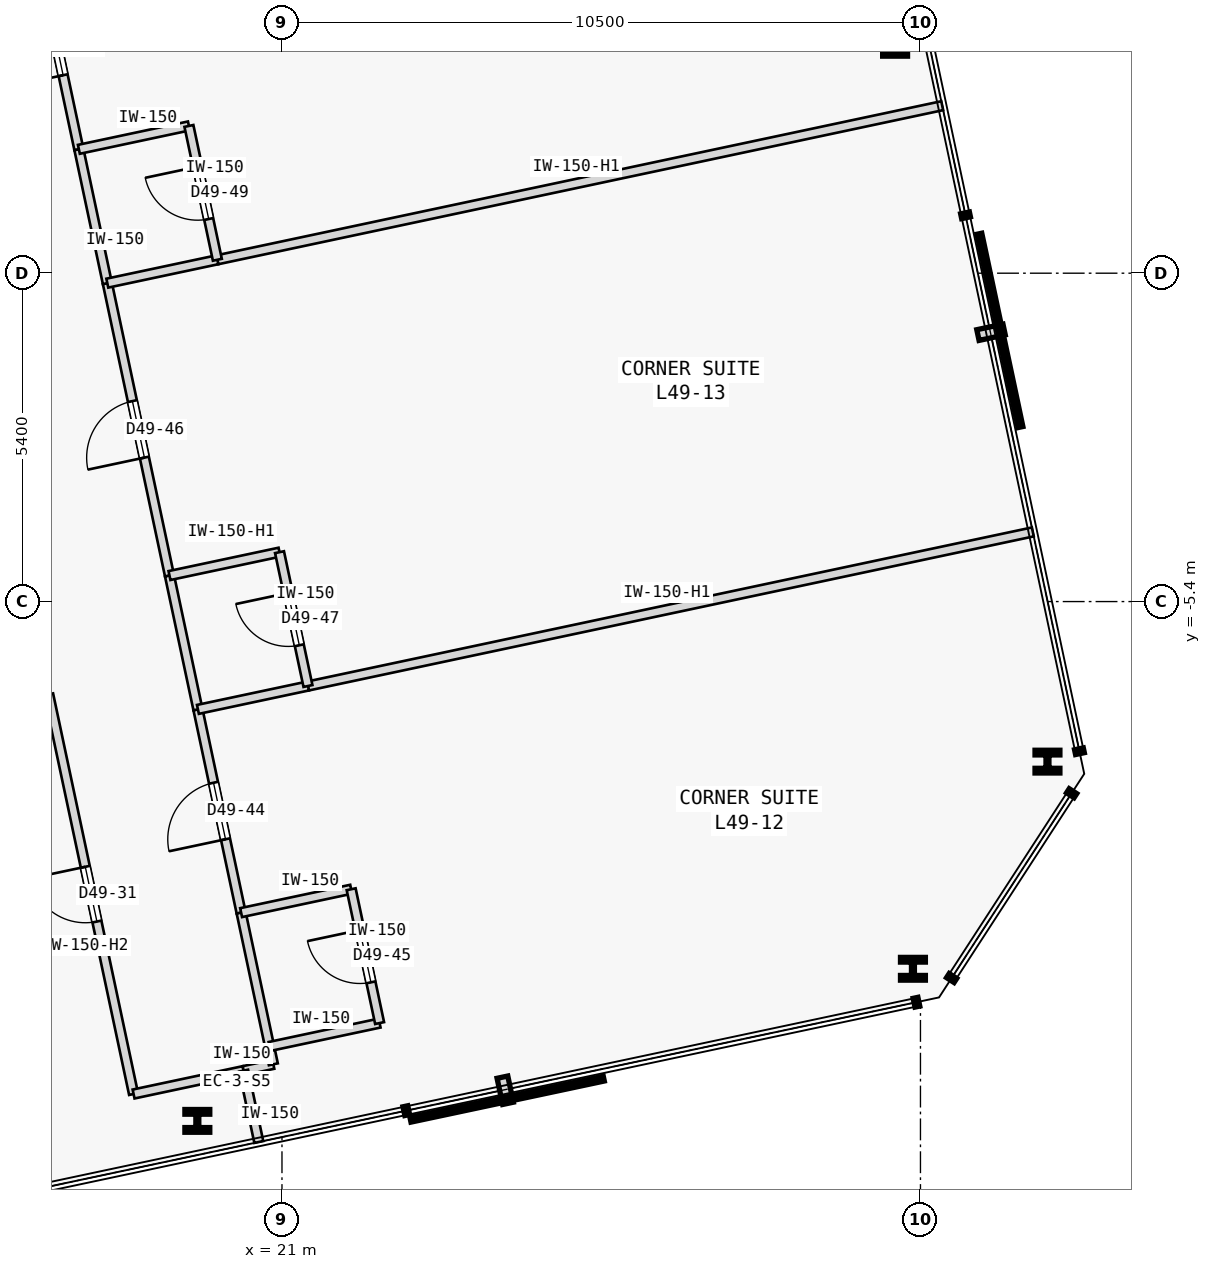
"""IFC4 building model, lengths in metres.
Left out: names, types, materials, properties, quantities, classifications, styles, units other than length and angle.
Written with IfcOpenShell. Run it as: python <this file> out.ifc"""

import sys

from ifc_helpers import new_model, si_unit, direction, frame, frame_2d, origin, origin_2d, place, context, subcontext, project, spatial, rectangle, i_section, extrude, element, fill, save


model = new_model("IFC4")
c1 = context("Model", 3, precision=1e-05, world=origin(), true_north=direction((0.0, 1.0)))
c2 = subcontext(c1, "Body", "Model", "MODEL_VIEW")
j1 = project(units=[si_unit("LENGTHUNIT", "METRE"), si_unit("PLANEANGLEUNIT", "RADIAN")], contexts=[c1])
p1 = place(None, origin())
s1 = spatial("IfcSite", under=j1, at=p1, CompositionType="ELEMENT")
p2 = place(p1, origin())
s2 = spatial("IfcBuilding", under=s1, at=p2, CompositionType="ELEMENT")
p3 = place(p2, frame((0.0, 0.0, 188.8)))
s3 = spatial("IfcBuildingStorey", under=s2, at=p3, CompositionType="ELEMENT", Elevation=188.8)
for number, where, z_axis, x_axis in (
    (1, (19.608, -13.94, 0.0), (0.0, 0.0, 1.0), (1.0, 0.0, 0.0)),
    (2, (31.376, -11.439, 0.0), (0.0, 0.0, 1.0), (1.0, 0.0, 0.0)),
    (3, (33.589, -8.032, 0.0), (0.0, 0.0, 1.0), (1.0, 0.0, 0.0)),
    (4, (31.083, 3.756, 0.0), (0.0, 0.0, 1.0), (1.0, 0.0, 0.0)),
):
    element("IfcColumn", number, at=place(p3, frame(where, z_axis=z_axis, x_axis=x_axis)), inside=s3, PredefinedType="COLUMN", context=c2, shape_type="SweptSolid", body=[
        extrude(i_section(OverallWidth=0.409, OverallDepth=0.374, WebThickness=0.048, FlangeThickness=0.077, FilletRadius=0.015, at=origin_2d()), origin(), (0.0, 0.0, 1.0), 3.4),
    ])
p4 = place(p3, frame((18.56, -13.498, 0.0), z_axis=(0.0, 0.0, 1.0), x_axis=(-0.207888737749, 0.978152479278, 0.0)))
e5 = element("IfcWall", 5, at=p4, inside=s3, PredefinedType="PARTITIONING", context=c2, shape_type="SweptSolid", body=[
    extrude(rectangle(XDim=6.72, YDim=0.15, at=frame_2d((3.36, 0.0))), origin(), (0.0, 0.0, 1.0), 2.575),
])
p5 = place(p4, frame((2.9, 0.0, 0.0)))
e6 = element("IfcOpeningElement", 6, at=p5, cuts=e5, PredefinedType="OPENING", context=c2, shape_type="SweptSolid", body=[
    extrude(rectangle(XDim=0.92, YDim=2.15, at=frame_2d((0.46, 1.075))), frame((0.0, 0.085, 0.0), z_axis=(0.0, -1.0, 0.0), x_axis=(1.0, 0.0, 0.0)), (0.0, 0.0, 1.0), 0.17),
])
p6 = place(p3, frame((18.56, -13.498, 0.0), z_axis=(0.0, 0.0, 1.0), x_axis=(0.978160192495, 0.207852442415, 0.0)))
e7 = element("IfcWall", 7, at=p6, inside=s3, PredefinedType="PARTITIONING", context=c2, shape_type="SweptSolid", body=[
    extrude(rectangle(XDim=1.85, YDim=0.15, at=frame_2d((0.925, 0.0))), origin(), (0.0, 0.0, 1.0), 3.175),
])
p7 = place(p3, frame((20.369, -13.114, 0.0), z_axis=(0.0, 0.0, 1.0), x_axis=(0.978143962546, 0.207928806409, 0.0)))
e8 = element("IfcWall", 8, at=p7, inside=s3, PredefinedType="PARTITIONING", context=c2, shape_type="SweptSolid", body=[
    extrude(rectangle(XDim=0.5, YDim=0.15, at=frame_2d((0.25, 0.0))), origin(), (0.0, 0.0, 1.0), 3.175),
])
p8 = place(p3, frame((20.858, -13.01, 0.0), z_axis=(0.0, 0.0, 1.0), x_axis=(-0.208306395052, 0.978063620518, 0.0)))
e9 = element("IfcWall", 9, at=p8, inside=s3, PredefinedType="PARTITIONING", context=c2, shape_type="SweptSolid", body=[
    extrude(rectangle(XDim=0.3, YDim=0.15, at=frame_2d((0.15, 0.0))), origin(), (0.0, 0.0, 1.0), 3.175),
])
p9 = place(p3, frame((20.328, -10.515, 0.0), z_axis=(0.0, 0.0, 1.0), x_axis=(-0.207918572776, 0.978146137903, 0.0)))
e10 = element("IfcWall", 10, at=p9, inside=s3, PredefinedType="PARTITIONING", context=c2, shape_type="SweptSolid", body=[
    extrude(rectangle(XDim=3.417, YDim=0.15, at=frame_2d((1.708, 0.0))), origin(), (0.0, 0.0, 1.0), 3.175),
])
p10 = place(p9, frame((1.233, 0.0, 0.0)))
e11 = element("IfcOpeningElement", 11, at=p10, cuts=e10, PredefinedType="OPENING", context=c2, shape_type="SweptSolid", body=[
    extrude(rectangle(XDim=0.95, YDim=2.15, at=frame_2d((0.475, 1.075))), frame((0.0, 0.085, 0.0), z_axis=(0.0, -1.0, 0.0), x_axis=(1.0, 0.0, 0.0)), (0.0, 0.0, 1.0), 0.17),
])
p11 = place(p3, frame((20.796, -12.716, 0.0), z_axis=(0.0, 0.0, 1.0), x_axis=(-0.207891197838, 0.978151956427, 0.0)))
e12 = element("IfcWall", 12, at=p11, inside=s3, PredefinedType="PARTITIONING", context=c2, shape_type="SweptSolid", body=[
    extrude(rectangle(XDim=2.25, YDim=0.15, at=frame_2d((1.125, 0.0))), origin(), (0.0, 0.0, 1.0), 3.175),
])
p12 = place(p3, frame((19.15, -4.972, 0.0), z_axis=(0.0, 0.0, 1.0), x_axis=(-0.207934781332, 0.978142692409, 0.0)))
e13 = element("IfcWall", 13, at=p12, inside=s3, PredefinedType="PARTITIONING", context=c2, shape_type="SweptSolid", body=[
    extrude(rectangle(XDim=4.916, YDim=0.15, at=frame_2d((2.458, 0.0))), origin(), (0.0, 0.0, 1.0), 3.175),
])
p13 = place(p12, frame((1.983, 0.0, 0.0)))
e14 = element("IfcOpeningElement", 14, at=p13, cuts=e13, PredefinedType="OPENING", context=c2, shape_type="SweptSolid", body=[
    extrude(rectangle(XDim=0.95, YDim=2.15, at=frame_2d((0.475, 1.075))), frame((0.0, 0.085, 0.0), z_axis=(0.0, -1.0, 0.0), x_axis=(1.0, 0.0, 0.0)), (0.0, 0.0, 1.0), 0.17),
])
p14 = place(p3, frame((19.618, -7.173, 0.0), z_axis=(0.0, 0.0, 1.0), x_axis=(-0.207913264065, 0.978147266328, 0.0)))
e15 = element("IfcWall", 15, at=p14, inside=s3, PredefinedType="PARTITIONING", context=c2, shape_type="SweptSolid", body=[
    extrude(rectangle(XDim=2.25, YDim=0.15, at=frame_2d((1.125, 0.0))), origin(), (0.0, 0.0, 1.0), 3.175),
])
p15 = place(p3, frame((17.66, 2.037, 0.0), z_axis=(0.0, 0.0, 1.0), x_axis=(-0.207894386012, 0.978151278824, 0.0)))
e16 = element("IfcWall", 16, at=p15, inside=s3, PredefinedType="PARTITIONING", context=c2, shape_type="SweptSolid", body=[
    extrude(rectangle(XDim=4.917, YDim=0.15, at=frame_2d((2.458, 0.0))), origin(), (0.0, 0.0, 1.0), 3.175),
])
p16 = place(p15, frame((1.246, 0.0, 0.0)))
e17 = element("IfcOpeningElement", 17, at=p16, cuts=e16, PredefinedType="OPENING", context=c2, shape_type="SweptSolid", body=[
    extrude(rectangle(XDim=0.95, YDim=2.15, at=frame_2d((0.475, 1.075))), frame((0.0, 0.085, 0.0), z_axis=(0.0, -1.0, 0.0), x_axis=(1.0, 0.0, 0.0)), (0.0, 0.0, 1.0), 0.17),
])
p17 = place(p3, frame((18.128, -0.164, 0.0), z_axis=(0.0, 0.0, 1.0), x_axis=(-0.207891197838, 0.978151956427, 0.0)))
e18 = element("IfcWall", 18, at=p17, inside=s3, PredefinedType="PARTITIONING", context=c2, shape_type="SweptSolid", body=[
    extrude(rectangle(XDim=2.25, YDim=0.15, at=frame_2d((1.125, 0.0))), origin(), (0.0, 0.0, 1.0), 3.175),
])
p18 = place(p3, frame((20.619, -14.288, 0.0), z_axis=(0.0, 0.0, 1.0), x_axis=(-0.207917150959, 0.978146440129, 0.0)))
e19 = element("IfcWall", 19, at=p18, inside=s3, PredefinedType="PARTITIONING", context=c2, shape_type="SweptSolid", body=[
    extrude(rectangle(XDim=1.2, YDim=0.15, at=frame_2d((0.6, 0.0))), origin(), (0.0, 0.0, 1.0), 3.175),
])
for number, where, z_axis, x_axis in (
    (20, (20.796, -12.716, 0.0), (0.0, 0.0, 1.0), (0.978, 0.208, 0.0)),
    (21, (20.328, -10.515, 0.0), (0.0, 0.0, 1.0), (0.978, 0.208, 0.0)),
):
    element("IfcWall", number, at=place(p3, frame(where, z_axis=z_axis, x_axis=x_axis)), inside=s3, PredefinedType="PARTITIONING", context=c2, shape_type="SweptSolid", body=[
        extrude(rectangle(XDim=1.85, YDim=0.15, at=frame_2d((0.925, 0.0))), origin(), (0.0, 0.0, 1.0), 3.175),
    ])
p19 = place(p3, frame((22.605, -12.332, 0.0), z_axis=(0.0, 0.0, 1.0), x_axis=(-0.207891197838, 0.978151956427, 0.0)))
e22 = element("IfcWall", 22, at=p19, inside=s3, PredefinedType="PARTITIONING", context=c2, shape_type="SweptSolid", body=[
    extrude(rectangle(XDim=2.25, YDim=0.15, at=frame_2d((1.125, 0.0))), origin(), (0.0, 0.0, 1.0), 3.175),
])
p20 = place(p19, frame((0.685, 0.0, 0.0)))
e23 = element("IfcOpeningElement", 23, at=p20, cuts=e22, PredefinedType="OPENING", context=c2, shape_type="SweptSolid", body=[
    extrude(rectangle(XDim=0.88, YDim=2.15, at=frame_2d((0.44, 1.075))), frame((0.0, 0.085, 0.0), z_axis=(0.0, -1.0, 0.0), x_axis=(1.0, 0.0, 0.0)), (0.0, 0.0, 1.0), 0.17),
])
p21 = place(p3, frame((21.427, -6.789, 0.0), z_axis=(0.0, 0.0, 1.0), x_axis=(0.97814556055, 0.207921288896, 0.0)))
e24 = element("IfcWall", 24, at=p21, inside=s3, PredefinedType="PARTITIONING", context=c2, shape_type="SweptSolid", body=[
    extrude(rectangle(XDim=12.187, YDim=0.15, at=frame_2d((6.094, 0.0))), origin(), (0.0, 0.0, 1.0), 2.725),
])
p22 = place(p3, frame((19.618, -7.173, 0.0), z_axis=(0.0, 0.0, 1.0), x_axis=(0.978160192495, 0.207852442415, 0.0)))
e25 = element("IfcWall", 25, at=p22, inside=s3, PredefinedType="PARTITIONING", context=c2, shape_type="SweptSolid", body=[
    extrude(rectangle(XDim=1.85, YDim=0.15, at=frame_2d((0.925, 0.0))), origin(), (0.0, 0.0, 1.0), 3.175),
])
p23 = place(p3, frame((19.15, -4.972, 0.0), z_axis=(0.0, 0.0, 1.0), x_axis=(0.978133353907, 0.20797870558, 0.0)))
e26 = element("IfcWall", 26, at=p23, inside=s3, PredefinedType="PARTITIONING", context=c2, shape_type="SweptSolid", body=[
    extrude(rectangle(XDim=1.85, YDim=0.15, at=frame_2d((0.925, 0.0))), origin(), (0.0, 0.0, 1.0), 2.725),
])
p24 = place(p3, frame((21.427, -6.789, 0.0), z_axis=(0.0, 0.0, 1.0), x_axis=(-0.207891197838, 0.978151956427, 0.0)))
e27 = element("IfcWall", 27, at=p24, inside=s3, PredefinedType="PARTITIONING", context=c2, shape_type="SweptSolid", body=[
    extrude(rectangle(XDim=2.25, YDim=0.15, at=frame_2d((1.125, 0.0))), origin(), (0.0, 0.0, 1.0), 3.175),
])
p25 = place(p24, frame((0.685, 0.0, 0.0)))
e28 = element("IfcOpeningElement", 28, at=p25, cuts=e27, PredefinedType="OPENING", context=c2, shape_type="SweptSolid", body=[
    extrude(rectangle(XDim=0.88, YDim=2.15, at=frame_2d((0.44, 1.075))), frame((0.0, 0.085, 0.0), z_axis=(0.0, -1.0, 0.0), x_axis=(1.0, 0.0, 0.0)), (0.0, 0.0, 1.0), 0.17),
])
p26 = place(p3, frame((19.938, 0.221, 0.0), z_axis=(0.0, 0.0, 1.0), x_axis=(0.978144694478, 0.207925363208, 0.0)))
e29 = element("IfcWall", 29, at=p26, inside=s3, PredefinedType="PARTITIONING", context=c2, shape_type="SweptSolid", body=[
    extrude(rectangle(XDim=12.187, YDim=0.15, at=frame_2d((6.093, 0.0))), origin(), (0.0, 0.0, 1.0), 2.725),
])
p27 = place(p3, frame((18.128, -0.164, 0.0), z_axis=(0.0, 0.0, 1.0), x_axis=(0.978165892835, 0.207825614625, 0.0)))
e30 = element("IfcWall", 30, at=p27, inside=s3, PredefinedType="PARTITIONING", context=c2, shape_type="SweptSolid", body=[
    extrude(rectangle(XDim=1.85, YDim=0.15, at=frame_2d((0.925, 0.0))), origin(), (0.0, 0.0, 1.0), 3.175),
])
p28 = place(p3, frame((17.66, 2.037, 0.0), z_axis=(0.0, 0.0, 1.0), x_axis=(0.978160192495, 0.207852442415, 0.0)))
e31 = element("IfcWall", 31, at=p28, inside=s3, PredefinedType="PARTITIONING", context=c2, shape_type="SweptSolid", body=[
    extrude(rectangle(XDim=1.85, YDim=0.15, at=frame_2d((0.925, 0.0))), origin(), (0.0, 0.0, 1.0), 3.175),
])
p29 = place(p3, frame((19.938, 0.221, 0.0), z_axis=(0.0, 0.0, 1.0), x_axis=(-0.207995007687, 0.978129887478, 0.0)))
e32 = element("IfcWall", 32, at=p29, inside=s3, PredefinedType="PARTITIONING", context=c2, shape_type="SweptSolid", body=[
    extrude(rectangle(XDim=2.25, YDim=0.15, at=frame_2d((1.125, 0.0))), origin(), (0.0, 0.0, 1.0), 3.175),
])
p30 = place(p29, frame((0.685, 0.0, 0.0)))
e33 = element("IfcOpeningElement", 33, at=p30, cuts=e32, PredefinedType="OPENING", context=c2, shape_type="SweptSolid", body=[
    extrude(rectangle(XDim=0.88, YDim=2.15, at=frame_2d((0.44, 1.075))), frame((0.0, 0.085, 0.0), z_axis=(0.0, -1.0, 0.0), x_axis=(1.0, 0.0, 0.0)), (0.0, 0.0, 1.0), 0.17),
])
p31 = place(p5, origin())
e34 = element("IfcDoor", 34, at=p31, inside=s3, OperationType="SINGLE_SWING_RIGHT", PredefinedType="DOOR", context=c2, shape_type="SweptSolid", body=[
    extrude(rectangle(XDim=0.92, YDim=2.15, at=frame_2d((0.46, 1.075))), frame((0.0, 0.025, 0.0), z_axis=(0.0, -1.0, 0.0), x_axis=(1.0, 0.0, 0.0)), (0.0, 0.0, 1.0), 0.05),
])
fill(e6, e34)
p32 = place(p10, origin())
e35 = element("IfcDoor", 35, at=p32, inside=s3, OperationType="SINGLE_SWING_LEFT", PredefinedType="DOOR", context=c2, shape_type="SweptSolid", body=[
    extrude(rectangle(XDim=0.95, YDim=2.15, at=frame_2d((0.475, 1.075))), frame((0.0, 0.025, 0.0), z_axis=(0.0, -1.0, 0.0), x_axis=(1.0, 0.0, 0.0)), (0.0, 0.0, 1.0), 0.05),
])
fill(e11, e35)
p33 = place(p20, origin())
e36 = element("IfcDoor", 36, at=p33, inside=s3, OperationType="SINGLE_SWING_RIGHT", PredefinedType="DOOR", context=c2, shape_type="SweptSolid", body=[
    extrude(rectangle(XDim=0.88, YDim=2.15, at=frame_2d((0.44, 1.075))), frame((0.0, 0.025, 0.0), z_axis=(0.0, -1.0, 0.0), x_axis=(1.0, 0.0, 0.0)), (0.0, 0.0, 1.0), 0.05),
])
fill(e23, e36)
p34 = place(p13, origin())
e37 = element("IfcDoor", 37, at=p34, inside=s3, OperationType="SINGLE_SWING_LEFT", PredefinedType="DOOR", context=c2, shape_type="SweptSolid", body=[
    extrude(rectangle(XDim=0.95, YDim=2.15, at=frame_2d((0.475, 1.075))), frame((0.0, 0.025, 0.0), z_axis=(0.0, -1.0, 0.0), x_axis=(1.0, 0.0, 0.0)), (0.0, 0.0, 1.0), 0.05),
])
fill(e14, e37)
p35 = place(p25, origin())
e38 = element("IfcDoor", 38, at=p35, inside=s3, OperationType="SINGLE_SWING_RIGHT", PredefinedType="DOOR", context=c2, shape_type="SweptSolid", body=[
    extrude(rectangle(XDim=0.88, YDim=2.15, at=frame_2d((0.44, 1.075))), frame((0.0, 0.025, 0.0), z_axis=(0.0, -1.0, 0.0), x_axis=(1.0, 0.0, 0.0)), (0.0, 0.0, 1.0), 0.05),
])
fill(e28, e38)
p36 = place(p16, origin())
e39 = element("IfcDoor", 39, at=p36, inside=s3, OperationType="SINGLE_SWING_LEFT", PredefinedType="DOOR", context=c2, shape_type="SweptSolid", body=[
    extrude(rectangle(XDim=0.95, YDim=2.15, at=frame_2d((0.475, 1.075))), frame((0.0, 0.025, 0.0), z_axis=(0.0, -1.0, 0.0), x_axis=(1.0, 0.0, 0.0)), (0.0, 0.0, 1.0), 0.05),
])
fill(e17, e39)
p37 = place(p30, origin())
e40 = element("IfcDoor", 40, at=p37, inside=s3, OperationType="SINGLE_SWING_RIGHT", PredefinedType="DOOR", context=c2, shape_type="SweptSolid", body=[
    extrude(rectangle(XDim=0.88, YDim=2.15, at=frame_2d((0.44, 1.075))), frame((0.0, 0.025, 0.0), z_axis=(0.0, -1.0, 0.0), x_axis=(1.0, 0.0, 0.0)), (0.0, 0.0, 1.0), 0.05),
])
fill(e33, e40)
save(model, sys.argv[1])
